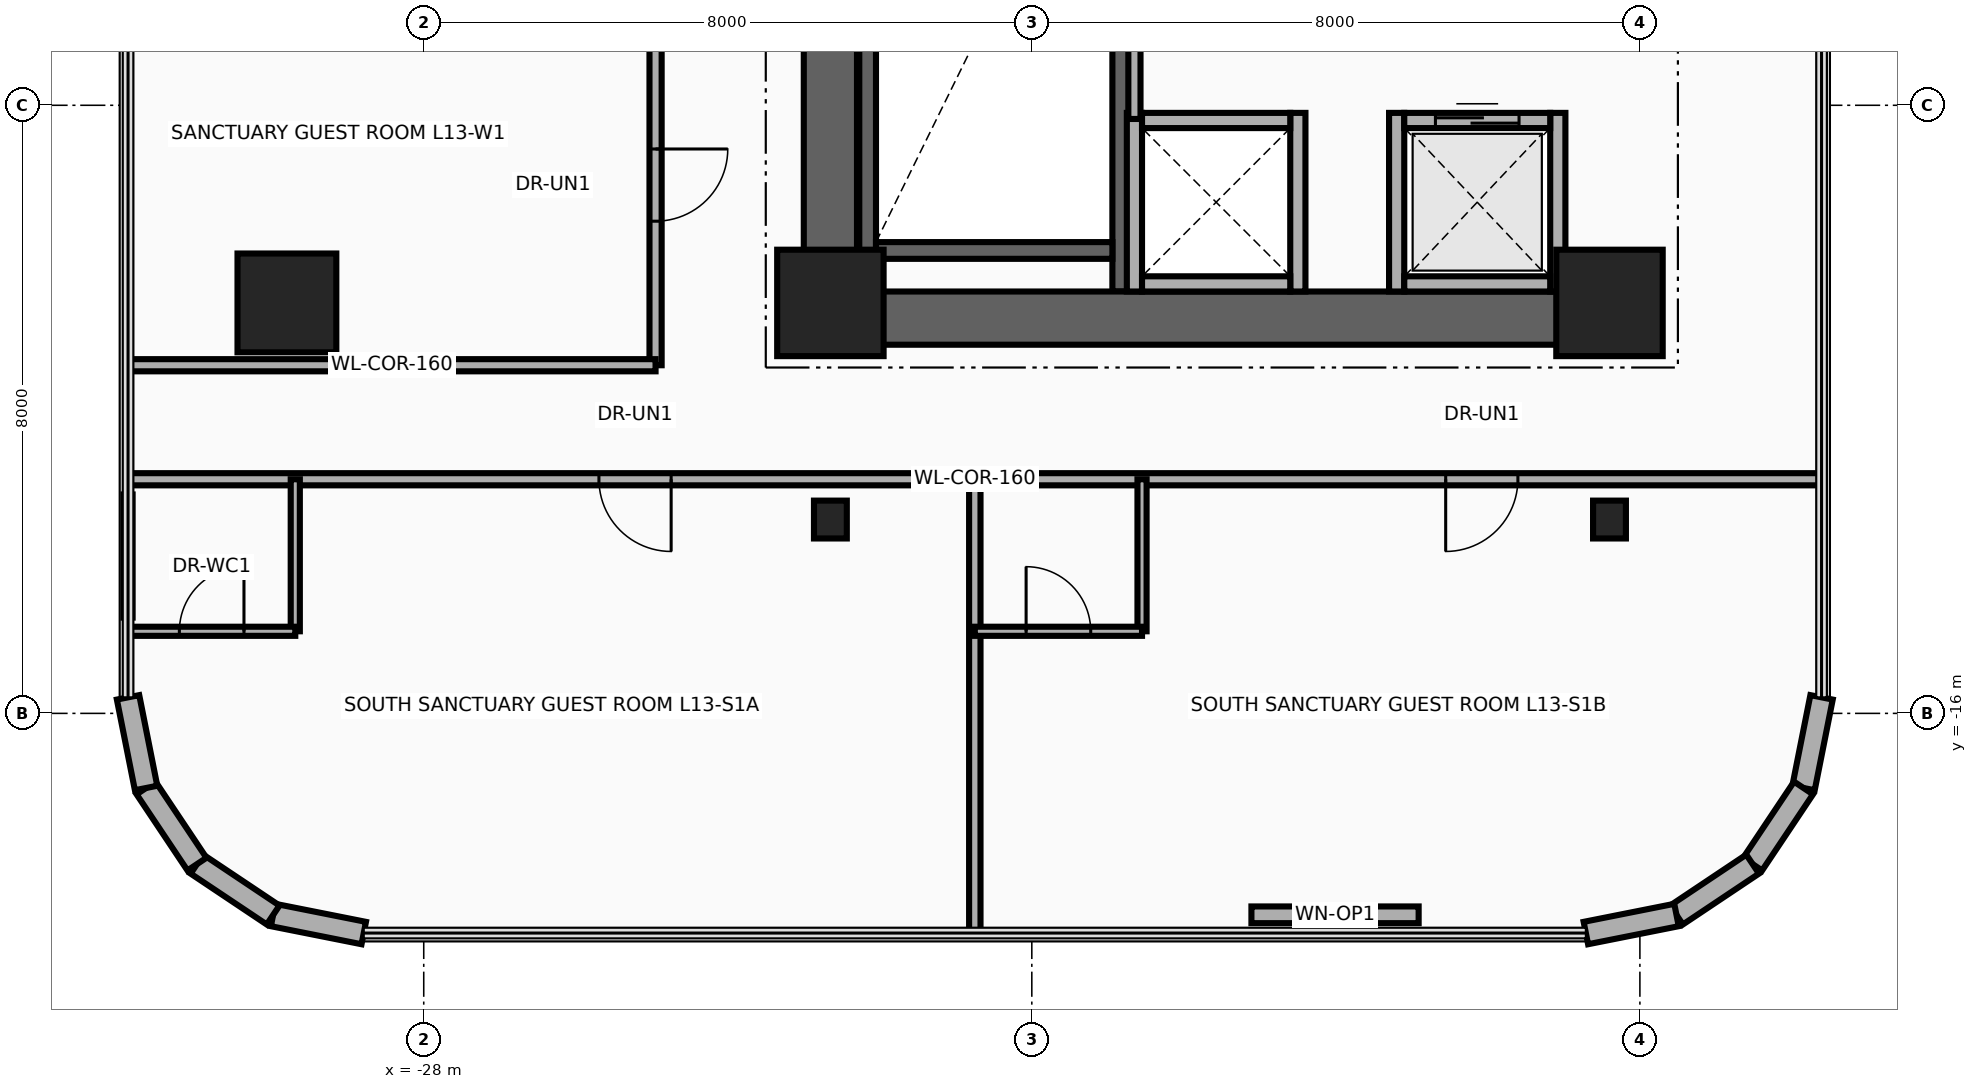
"""IFC4 building model, lengths in metres.
Left out: names, types, materials, properties, quantities, classifications, styles, units other than length and angle.
Written with IfcOpenShell. Run it as: python <this file> out.ifc"""

import sys

from ifc_helpers import new_model, si_unit, direction, frame, frame_2d, origin, origin_2d, place, context, subcontext, project, spatial, rectangle, circle, i_section, extrude, source, transform, mapped, element, fill, save


model = new_model("IFC4")
c1 = context("Model", 3, precision=1e-05, world=origin(), true_north=direction((0.0, 1.0)))
c2 = subcontext(c1, "Body", "Model", "MODEL_VIEW")
j1 = project(units=[si_unit("LENGTHUNIT", "METRE"), si_unit("PLANEANGLEUNIT", "RADIAN")], contexts=[c1])
p1 = place(None, origin())
s1 = spatial("IfcSite", under=j1, at=p1, CompositionType="ELEMENT")
p2 = place(p1, origin())
s2 = spatial("IfcBuilding", under=s1, at=p2, CompositionType="ELEMENT")
p3 = place(p2, frame((0.0, 0.0, 55.6)))
s3 = spatial("IfcBuildingStorey", under=s2, at=p3, CompositionType="ELEMENT", Elevation=55.6)
for number, where, z_axis, x_axis in (
    (1, (-22.16, -10.45, 0.0), (0.0, 0.0, 1.0), (0.0, 1.0, 0.0)),
    (2, (-18.83, -10.45, 0.0), (0.0, 0.0, 1.0), (0.0, 1.0, 0.0)),
):
    element("IfcWall", number, at=place(p3, frame(where, z_axis=z_axis, x_axis=x_axis)), inside=s3, PredefinedType="SHEAR", context=c2, shape_type="SweptSolid", body=[
        extrude(rectangle(XDim=8.67, YDim=0.22, at=frame_2d((4.335, 0.0))), origin(), (0.0, 0.0, 1.0), 3.46),
    ])
p4 = place(p3, frame((-22.05, -9.91, 0.0), z_axis=(0.0, 0.0, 1.0), x_axis=(1.0, 0.0, 0.0)))
e3 = element("IfcWall", 3, at=p4, inside=s3, PredefinedType="SHEAR", context=c2, shape_type="SweptSolid", body=[
    extrude(rectangle(XDim=3.11, YDim=0.22, at=frame_2d((1.555, 0.0))), origin(), (0.0, 0.0, 1.0), 3.46),
])
p5 = place(p3, frame((-22.65, -11.15, 0.0), z_axis=(0.0, 0.0, 1.0), x_axis=(0.0, 1.0, 0.0)))
e4 = element("IfcWall", 4, at=p5, inside=s3, PredefinedType="SHEAR", context=c2, shape_type="SweptSolid", body=[
    extrude(rectangle(XDim=22.3, YDim=0.7, at=frame_2d((11.15, 0.0))), origin(), (0.0, 0.0, 1.0), 3.46),
])
p6 = place(p3, frame((-22.65, -10.8, 0.0), z_axis=(0.0, 0.0, 1.0), x_axis=(1.0, 0.0, 0.0)))
e5 = element("IfcWall", 5, at=p6, inside=s3, PredefinedType="SHEAR", context=c2, shape_type="SweptSolid", body=[
    extrude(rectangle(XDim=10.25, YDim=0.7, at=frame_2d((5.125, 0.0))), origin(), (0.0, 0.0, 1.0), 3.46),
])
m1 = source(origin(), c2, "Body", "SweptSolid", [
    extrude(circle(Radius=0.65, at=origin_2d()), origin(), (0.0, 0.0, 1.0), 3.7),
])
p7 = place(p3, frame((-29.8, -10.6, 0.0), z_axis=(0.0, 0.0, 1.0), x_axis=(1.0, 0.0, 0.0)))
e6 = element("IfcColumn", 6, at=p7, inside=s3, PredefinedType="COLUMN", context=c2, shape_type="MappedRepresentation", body=[
    mapped(m1, transform((0.0, 0.0, 0.0), x_axis=(1.0, 0.0, 0.0), y_axis=(0.0, 1.0, 0.0), z_axis=(0.0, 0.0, 1.0), scale=1.0)),
])
m2 = source(origin(), c2, "Body", "SweptSolid", [
    extrude(rectangle(XDim=1.4, YDim=1.4, at=origin_2d()), origin(), (0.0, 0.0, 1.0), 3.7),
])
for number, where, z_axis, x_axis in (
    (7, (-22.65, -10.6, 0.0), (0.0, 0.0, 1.0), (1.0, 0.0, 0.0)),
    (8, (-12.4, -10.6, 0.0), (0.0, 0.0, 1.0), (1.0, 0.0, 0.0)),
):
    element("IfcColumn", number, at=place(p3, frame(where, z_axis=z_axis, x_axis=x_axis)), inside=s3, PredefinedType="COLUMN", context=c2, shape_type="MappedRepresentation", body=[
        mapped(m2, transform((0.0, 0.0, 0.0), x_axis=(1.0, 0.0, 0.0), y_axis=(0.0, 1.0, 0.0), z_axis=(0.0, 0.0, 1.0), scale=1.0)),
    ])
m3 = source(origin(), c2, "Body", "SweptSolid", [
    extrude(i_section(OverallWidth=0.432, OverallDepth=0.498, WebThickness=0.056, FlangeThickness=0.089, at=origin_2d()), origin(), (0.0, 0.0, 1.0), 3.7),
])
for number, where, z_axis, x_axis in (
    (9, (-22.65, -13.45, 0.0), (0.0, 0.0, 1.0), (1.0, 0.0, 0.0)),
    (10, (-12.4, -13.45, 0.0), (0.0, 0.0, 1.0), (1.0, 0.0, 0.0)),
):
    element("IfcColumn", number, at=place(p3, frame(where, z_axis=z_axis, x_axis=x_axis)), inside=s3, PredefinedType="COLUMN", context=c2, shape_type="MappedRepresentation", body=[
        mapped(m3, transform((0.0, 0.0, 0.0), x_axis=(1.0, 0.0, 0.0), y_axis=(0.0, 1.0, 0.0), z_axis=(0.0, 0.0, 1.0), scale=1.0)),
    ])
p8 = place(p3, frame((-9.61, -15.789, 0.0), z_axis=(0.0, 0.0, 1.0), x_axis=(-0.194996050505, -0.980804027463, 0.0)))
e11 = element("IfcWall", 11, at=p8, inside=s3, PredefinedType="SOLIDWALL", context=c2, shape_type="SweptSolid", body=[
    extrude(rectangle(XDim=1.216, YDim=0.3, at=frame_2d((0.608, 0.0))), origin(), (0.0, 0.0, 1.0), 3.46),
])
for number, where, z_axis, x_axis in (
    (12, (-9.847, -16.982, 0.0), (0.0, 0.0, 1.0), (-0.556, -0.831, 0.0)),
    (13, (-10.517, -17.983, 0.0), (0.0, 0.0, 1.0), (-0.831, -0.556, 0.0)),
):
    element("IfcWall", number, at=place(p3, frame(where, z_axis=z_axis, x_axis=x_axis)), inside=s3, PredefinedType="SOLIDWALL", context=c2, shape_type="SweptSolid", body=[
        extrude(rectangle(XDim=1.205, YDim=0.3, at=frame_2d((0.603, 0.0))), origin(), (0.0, 0.0, 1.0), 3.46),
    ])
p9 = place(p3, frame((-11.518, -18.653, 0.0), z_axis=(0.0, 0.0, 1.0), x_axis=(-0.980804027463, -0.194996050505, 0.0)))
e14 = element("IfcWall", 14, at=p9, inside=s3, PredefinedType="SOLIDWALL", context=c2, shape_type="SweptSolid", body=[
    extrude(rectangle(XDim=1.216, YDim=0.3, at=frame_2d((0.608, 0.0))), origin(), (0.0, 0.0, 1.0), 3.46),
])
p10 = place(p3, frame((-14.911, -18.65, 0.0), z_axis=(0.0, 0.0, 1.0), x_axis=(-1.0, 0.0, 0.0)))
e15 = element("IfcWall", 15, at=p10, inside=s3, PredefinedType="SOLIDWALL", context=c2, shape_type="SweptSolid", body=[
    extrude(rectangle(XDim=2.2, YDim=0.22, at=frame_2d((1.1, 0.0))), origin(), (0.0, 0.0, 1.0), 3.46),
])
p11 = place(p10, frame((0.65, 0.0, 0.95)))
e16 = element("IfcOpeningElement", 16, at=p11, cuts=e15, PredefinedType="OPENING", context=c2, shape_type="SweptSolid", body=[
    extrude(rectangle(XDim=0.9, YDim=1.3, at=frame_2d((0.45, 0.65))), frame((0.0, 0.125, 0.0), z_axis=(0.0, -1.0, 0.0), x_axis=(1.0, 0.0, 0.0)), (0.0, 0.0, 1.0), 0.25),
])
p12 = place(p3, frame((-28.789, -18.89, 0.0), z_axis=(0.0, 0.0, 1.0), x_axis=(-0.980804027463, 0.194996050505, 0.0)))
e17 = element("IfcWall", 17, at=p12, inside=s3, PredefinedType="SOLIDWALL", context=c2, shape_type="SweptSolid", body=[
    extrude(rectangle(XDim=1.216, YDim=0.3, at=frame_2d((0.608, 0.0))), origin(), (0.0, 0.0, 1.0), 3.46),
])
for number, where, z_axis, x_axis in (
    (18, (-29.982, -18.653, 0.0), (0.0, 0.0, 1.0), (-0.831, 0.556, 0.0)),
    (19, (-30.983, -17.983, 0.0), (0.0, 0.0, 1.0), (-0.556, 0.831, 0.0)),
):
    element("IfcWall", number, at=place(p3, frame(where, z_axis=z_axis, x_axis=x_axis)), inside=s3, PredefinedType="SOLIDWALL", context=c2, shape_type="SweptSolid", body=[
        extrude(rectangle(XDim=1.205, YDim=0.3, at=frame_2d((0.603, 0.0))), origin(), (0.0, 0.0, 1.0), 3.46),
    ])
p13 = place(p3, frame((-31.653, -16.982, 0.0), z_axis=(0.0, 0.0, 1.0), x_axis=(-0.194996050505, 0.980804027463, 0.0)))
e20 = element("IfcWall", 20, at=p13, inside=s3, PredefinedType="SOLIDWALL", context=c2, shape_type="SweptSolid", body=[
    extrude(rectangle(XDim=1.216, YDim=0.3, at=frame_2d((0.608, 0.0))), origin(), (0.0, 0.0, 1.0), 3.46),
])
for number, where, z_axis, x_axis in (
    (21, (-15.2, -10.45, 0.0), (0.0, 0.0, 1.0), (0.0, 1.0, 0.0)),
    (22, (-13.08, -10.45, 0.0), (0.0, 0.0, 1.0), (0.0, 1.0, 0.0)),
):
    element("IfcWall", number, at=place(p3, frame(where, z_axis=z_axis, x_axis=x_axis)), inside=s3, PredefinedType="MOVABLE", context=c2, shape_type="SweptSolid", body=[
        extrude(rectangle(XDim=2.35, YDim=0.2, at=frame_2d((1.175, 0.0))), origin(), (0.0, 0.0, 1.0), 2.583),
    ])
p14 = place(p3, frame((-15.1, -10.35, 0.0), z_axis=(0.0, 0.0, 1.0), x_axis=(1.0, 0.0, 0.0)))
e23 = element("IfcWall", 23, at=p14, inside=s3, PredefinedType="MOVABLE", context=c2, shape_type="SweptSolid", body=[
    extrude(rectangle(XDim=1.92, YDim=0.2, at=frame_2d((0.96, 0.0))), origin(), (0.0, 0.0, 1.0), 2.583),
])
p15 = place(p3, frame((-15.1, -8.2, 0.0), z_axis=(0.0, 0.0, 1.0), x_axis=(1.0, 0.0, 0.0)))
e24 = element("IfcWall", 24, at=p15, inside=s3, PredefinedType="MOVABLE", context=c2, shape_type="SweptSolid", body=[
    extrude(rectangle(XDim=1.92, YDim=0.2, at=frame_2d((0.96, 0.0))), origin(), (0.0, 0.0, 1.0), 3.46),
])
p16 = place(p15, frame((0.41, 0.0, 0.0)))
e25 = element("IfcOpeningElement", 25, at=p16, cuts=e24, PredefinedType="OPENING", context=c2, shape_type="SweptSolid", body=[
    extrude(rectangle(XDim=1.1, YDim=2.1, at=frame_2d((0.55, 1.05))), frame((0.0, 0.115, 0.0), z_axis=(0.0, -1.0, 0.0), x_axis=(1.0, 0.0, 0.0)), (0.0, 0.0, 1.0), 0.23),
])
for number, where, z_axis, x_axis in (
    (26, (-18.65, -10.45, 0.0), (0.0, 0.0, 1.0), (0.0, 1.0, 0.0)),
    (27, (-16.5, -10.45, 0.0), (0.0, 0.0, 1.0), (0.0, 1.0, 0.0)),
):
    element("IfcWall", number, at=place(p3, frame(where, z_axis=z_axis, x_axis=x_axis)), inside=s3, PredefinedType="MOVABLE", context=c2, shape_type="SweptSolid", body=[
        extrude(rectangle(XDim=2.35, YDim=0.2, at=frame_2d((1.175, 0.0))), origin(), (0.0, 0.0, 1.0), 2.583),
    ])
p17 = place(p3, frame((-18.55, -10.35, 0.0), z_axis=(0.0, 0.0, 1.0), x_axis=(1.0, 0.0, 0.0)))
e28 = element("IfcWall", 28, at=p17, inside=s3, PredefinedType="MOVABLE", context=c2, shape_type="SweptSolid", body=[
    extrude(rectangle(XDim=1.95, YDim=0.2, at=frame_2d((0.975, 0.0))), origin(), (0.0, 0.0, 1.0), 2.583),
])
p18 = place(p3, frame((-18.55, -8.2, 0.0), z_axis=(0.0, 0.0, 1.0), x_axis=(1.0, 0.0, 0.0)))
e29 = element("IfcWall", 29, at=p18, inside=s3, PredefinedType="MOVABLE", context=c2, shape_type="SweptSolid", body=[
    extrude(rectangle(XDim=1.95, YDim=0.2, at=frame_2d((0.975, 0.0))), origin(), (0.0, 0.0, 1.0), 3.46),
])
p19 = place(p3, frame((-18.65, -8.18, 0.0), z_axis=(0.0, 0.0, 1.0), x_axis=(0.0, 1.0, 0.0)))
e30 = element("IfcWall", 30, at=p19, inside=s3, PredefinedType="PARTITIONING", context=c2, shape_type="SweptSolid", body=[
    extrude(rectangle(XDim=1.56, YDim=0.16, at=frame_2d((0.78, 0.0))), origin(), (0.0, 0.0, 1.0), 3.46),
])
p20 = place(p3, frame((-24.95, -11.42, 0.0), z_axis=(0.0, 0.0, 1.0), x_axis=(0.0, 1.0, 0.0)))
e31 = element("IfcWall", 31, at=p20, inside=s3, PredefinedType="PARTITIONING", context=c2, shape_type="SweptSolid", body=[
    extrude(rectangle(XDim=20.22, YDim=0.16, at=frame_2d((10.11, 0.0))), origin(), (0.0, 0.0, 1.0), 2.583),
])
p21 = place(p20, frame((1.895, 0.0, 0.0)))
e32 = element("IfcOpeningElement", 32, at=p21, cuts=e31, PredefinedType="OPENING", context=c2, shape_type="SweptSolid", body=[
    extrude(rectangle(XDim=0.95, YDim=2.15, at=frame_2d((0.475, 1.075))), frame((0.0, 0.095, 0.0), z_axis=(0.0, -1.0, 0.0), x_axis=(1.0, 0.0, 0.0)), (0.0, 0.0, 1.0), 0.19),
])
p22 = place(p20, frame((8.635, 0.0, 0.0)))
e33 = element("IfcOpeningElement", 33, at=p22, cuts=e31, PredefinedType="OPENING", context=c2, shape_type="SweptSolid", body=[
    extrude(rectangle(XDim=0.95, YDim=2.15, at=frame_2d((0.475, 1.075))), frame((0.0, 0.095, 0.0), z_axis=(0.0, -1.0, 0.0), x_axis=(1.0, 0.0, 0.0)), (0.0, 0.0, 1.0), 0.19),
])
p23 = place(p20, frame((17.375, 0.0, 0.0)))
e34 = element("IfcOpeningElement", 34, at=p23, cuts=e31, PredefinedType="OPENING", context=c2, shape_type="SweptSolid", body=[
    extrude(rectangle(XDim=0.95, YDim=2.15, at=frame_2d((0.475, 1.075))), frame((0.0, 0.095, 0.0), z_axis=(0.0, -1.0, 0.0), x_axis=(1.0, 0.0, 0.0)), (0.0, 0.0, 1.0), 0.19),
])
p24 = place(p3, frame((-31.89, -12.92, 0.0), z_axis=(0.0, 0.0, 1.0), x_axis=(1.0, 0.0, 0.0)))
e35 = element("IfcWall", 35, at=p24, inside=s3, PredefinedType="PARTITIONING", context=c2, shape_type="SweptSolid", body=[
    extrude(rectangle(XDim=22.28, YDim=0.16, at=frame_2d((11.14, 0.0))), origin(), (0.0, 0.0, 1.0), 2.834),
])
p25 = place(p24, frame((6.195, 0.0, 0.0)))
e36 = element("IfcOpeningElement", 36, at=p25, cuts=e35, PredefinedType="OPENING", context=c2, shape_type="SweptSolid", body=[
    extrude(rectangle(XDim=0.95, YDim=2.15, at=frame_2d((0.475, 1.075))), frame((0.0, 0.095, 0.0), z_axis=(0.0, -1.0, 0.0), x_axis=(1.0, 0.0, 0.0)), (0.0, 0.0, 1.0), 0.19),
])
p26 = place(p24, frame((17.335, 0.0, 0.0)))
e37 = element("IfcOpeningElement", 37, at=p26, cuts=e35, PredefinedType="OPENING", context=c2, shape_type="SweptSolid", body=[
    extrude(rectangle(XDim=0.95, YDim=2.15, at=frame_2d((0.475, 1.075))), frame((0.0, 0.095, 0.0), z_axis=(0.0, -1.0, 0.0), x_axis=(1.0, 0.0, 0.0)), (0.0, 0.0, 1.0), 0.19),
])
p27 = place(p3, frame((-20.75, -18.89, 0.0), z_axis=(0.0, 0.0, 1.0), x_axis=(0.0, 1.0, 0.0)))
e38 = element("IfcWall", 38, at=p27, inside=s3, PredefinedType="PARTITIONING", context=c2, shape_type="SweptSolid", body=[
    extrude(rectangle(XDim=5.97, YDim=0.15, at=frame_2d((2.985, 0.0))), origin(), (0.0, 0.0, 1.0), 2.896),
])
p28 = place(p3, frame((-29.69, -14.92, 0.0), z_axis=(0.0, 0.0, 1.0), x_axis=(0.0, 1.0, 0.0)))
e39 = element("IfcWall", 39, at=p28, inside=s3, PredefinedType="PARTITIONING", context=c2, shape_type="SweptSolid", body=[
    extrude(rectangle(XDim=2.0, YDim=0.12, at=frame_2d((1.0, 0.0))), origin(), (0.0, 0.0, 1.0), 3.46),
])
p29 = place(p3, frame((-31.89, -14.92, 0.0), z_axis=(0.0, 0.0, 1.0), x_axis=(1.0, 0.0, 0.0)))
e40 = element("IfcWall", 40, at=p29, inside=s3, PredefinedType="PARTITIONING", context=c2, shape_type="SweptSolid", body=[
    extrude(rectangle(XDim=2.2, YDim=0.12, at=frame_2d((1.1, 0.0))), origin(), (0.0, 0.0, 1.0), 3.46),
])
p30 = place(p29, frame((0.675, 0.0, 0.0)))
e41 = element("IfcOpeningElement", 41, at=p30, cuts=e40, PredefinedType="OPENING", context=c2, shape_type="SweptSolid", body=[
    extrude(rectangle(XDim=0.85, YDim=2.1, at=frame_2d((0.425, 1.05))), frame((0.0, 0.075, 0.0), z_axis=(0.0, -1.0, 0.0), x_axis=(1.0, 0.0, 0.0)), (0.0, 0.0, 1.0), 0.15),
])
p31 = place(p3, frame((-31.89, -14.74, 0.0), z_axis=(0.0, 0.0, 1.0), x_axis=(0.0, 1.0, 0.0)))
e42 = element("IfcWall", 42, at=p31, inside=s3, PredefinedType="PARTITIONING", context=c2, shape_type="SweptSolid", body=[
    extrude(rectangle(XDim=1.62, YDim=0.12, at=frame_2d((0.81, 0.0))), origin(), (0.0, 0.0, 1.0), 3.46),
])
p32 = place(p3, frame((-18.55, -14.92, 0.0), z_axis=(0.0, 0.0, 1.0), x_axis=(0.0, 1.0, 0.0)))
e43 = element("IfcWall", 43, at=p32, inside=s3, PredefinedType="PARTITIONING", context=c2, shape_type="SweptSolid", body=[
    extrude(rectangle(XDim=2.0, YDim=0.12, at=frame_2d((1.0, 0.0))), origin(), (0.0, 0.0, 1.0), 2.896),
])
p33 = place(p3, frame((-20.75, -14.92, 0.0), z_axis=(0.0, 0.0, 1.0), x_axis=(1.0, 0.0, 0.0)))
e44 = element("IfcWall", 44, at=p33, inside=s3, PredefinedType="PARTITIONING", context=c2, shape_type="SweptSolid", body=[
    extrude(rectangle(XDim=2.2, YDim=0.12, at=frame_2d((1.1, 0.0))), origin(), (0.0, 0.0, 1.0), 3.46),
])
p34 = place(p33, frame((0.675, 0.0, 0.0)))
e45 = element("IfcOpeningElement", 45, at=p34, cuts=e44, PredefinedType="OPENING", context=c2, shape_type="SweptSolid", body=[
    extrude(rectangle(XDim=0.85, YDim=2.1, at=frame_2d((0.425, 1.05))), frame((0.0, 0.075, 0.0), z_axis=(0.0, -1.0, 0.0), x_axis=(1.0, 0.0, 0.0)), (0.0, 0.0, 1.0), 0.15),
])
p35 = place(p3, frame((-31.89, -11.42, 0.0), z_axis=(0.0, 0.0, 1.0), x_axis=(1.0, 0.0, 0.0)))
e46 = element("IfcWall", 46, at=p35, inside=s3, PredefinedType="PARTITIONING", context=c2, shape_type="SweptSolid", body=[
    extrude(rectangle(XDim=6.94, YDim=0.16, at=frame_2d((3.47, 0.0))), origin(), (0.0, 0.0, 1.0), 3.46),
])
p36 = place(p11, origin())
e47 = element("IfcWindow", 47, at=p36, inside=s3, PartitioningType="SINGLE_PANEL", PredefinedType="WINDOW", context=c2, shape_type="SweptSolid", body=[
    extrude(rectangle(XDim=0.9, YDim=1.3, at=frame_2d((0.45, 0.65))), frame((0.0, 0.03, 0.0), z_axis=(0.0, -1.0, 0.0), x_axis=(1.0, 0.0, 0.0)), (0.0, 0.0, 1.0), 0.06),
])
fill(e16, e47)
p37 = place(p16, origin())
e48 = element("IfcDoor", 48, at=p37, inside=s3, OperationType="DOUBLE_DOOR_SLIDING", PredefinedType="DOOR", context=c2, shape_type="SweptSolid", body=[
    extrude(rectangle(XDim=1.1, YDim=2.1, at=frame_2d((0.55, 1.05))), frame((0.0, 0.025, 0.0), z_axis=(0.0, -1.0, 0.0), x_axis=(1.0, 0.0, 0.0)), (0.0, 0.0, 1.0), 0.05),
])
fill(e25, e48)
p38 = place(p21, frame((0.95, 0.0, 0.0), z_axis=(0.0, 0.0, 1.0), x_axis=(-1.0, 0.0, 0.0)))
e49 = element("IfcDoor", 49, at=p38, inside=s3, OperationType="SINGLE_SWING_LEFT", PredefinedType="DOOR", context=c2, shape_type="SweptSolid", body=[
    extrude(rectangle(XDim=0.95, YDim=2.15, at=frame_2d((0.475, 1.075))), frame((0.0, 0.025, 0.0), z_axis=(0.0, -1.0, 0.0), x_axis=(1.0, 0.0, 0.0)), (0.0, 0.0, 1.0), 0.05),
])
fill(e32, e49)
p39 = place(p25, frame((0.95, 0.0, 0.0), z_axis=(0.0, 0.0, 1.0), x_axis=(-1.0, 0.0, 0.0)))
e50 = element("IfcDoor", 50, at=p39, inside=s3, OperationType="SINGLE_SWING_LEFT", PredefinedType="DOOR", context=c2, shape_type="SweptSolid", body=[
    extrude(rectangle(XDim=0.95, YDim=2.15, at=frame_2d((0.475, 1.075))), frame((0.0, 0.025, 0.0), z_axis=(0.0, -1.0, 0.0), x_axis=(1.0, 0.0, 0.0)), (0.0, 0.0, 1.0), 0.05),
])
fill(e36, e50)
p40 = place(p30, origin())
e51 = element("IfcDoor", 51, at=p40, inside=s3, OperationType="SINGLE_SWING_RIGHT", PredefinedType="DOOR", context=c2, shape_type="SweptSolid", body=[
    extrude(rectangle(XDim=0.85, YDim=2.1, at=frame_2d((0.425, 1.05))), frame((0.0, 0.025, 0.0), z_axis=(0.0, -1.0, 0.0), x_axis=(1.0, 0.0, 0.0)), (0.0, 0.0, 1.0), 0.05),
])
fill(e41, e51)
p41 = place(p26, frame((0.95, 0.0, 0.0), z_axis=(0.0, 0.0, 1.0), x_axis=(-1.0, 0.0, 0.0)))
e52 = element("IfcDoor", 52, at=p41, inside=s3, OperationType="SINGLE_SWING_LEFT", PredefinedType="DOOR", context=c2, shape_type="SweptSolid", body=[
    extrude(rectangle(XDim=0.95, YDim=2.15, at=frame_2d((0.475, 1.075))), frame((0.0, 0.025, 0.0), z_axis=(0.0, -1.0, 0.0), x_axis=(1.0, 0.0, 0.0)), (0.0, 0.0, 1.0), 0.05),
])
fill(e37, e52)
p42 = place(p34, origin())
e53 = element("IfcDoor", 53, at=p42, inside=s3, OperationType="SINGLE_SWING_RIGHT", PredefinedType="DOOR", context=c2, shape_type="SweptSolid", body=[
    extrude(rectangle(XDim=0.85, YDim=2.1, at=frame_2d((0.425, 1.05))), frame((0.0, 0.025, 0.0), z_axis=(0.0, -1.0, 0.0), x_axis=(1.0, 0.0, 0.0)), (0.0, 0.0, 1.0), 0.05),
])
fill(e45, e53)
save(model, sys.argv[1])
